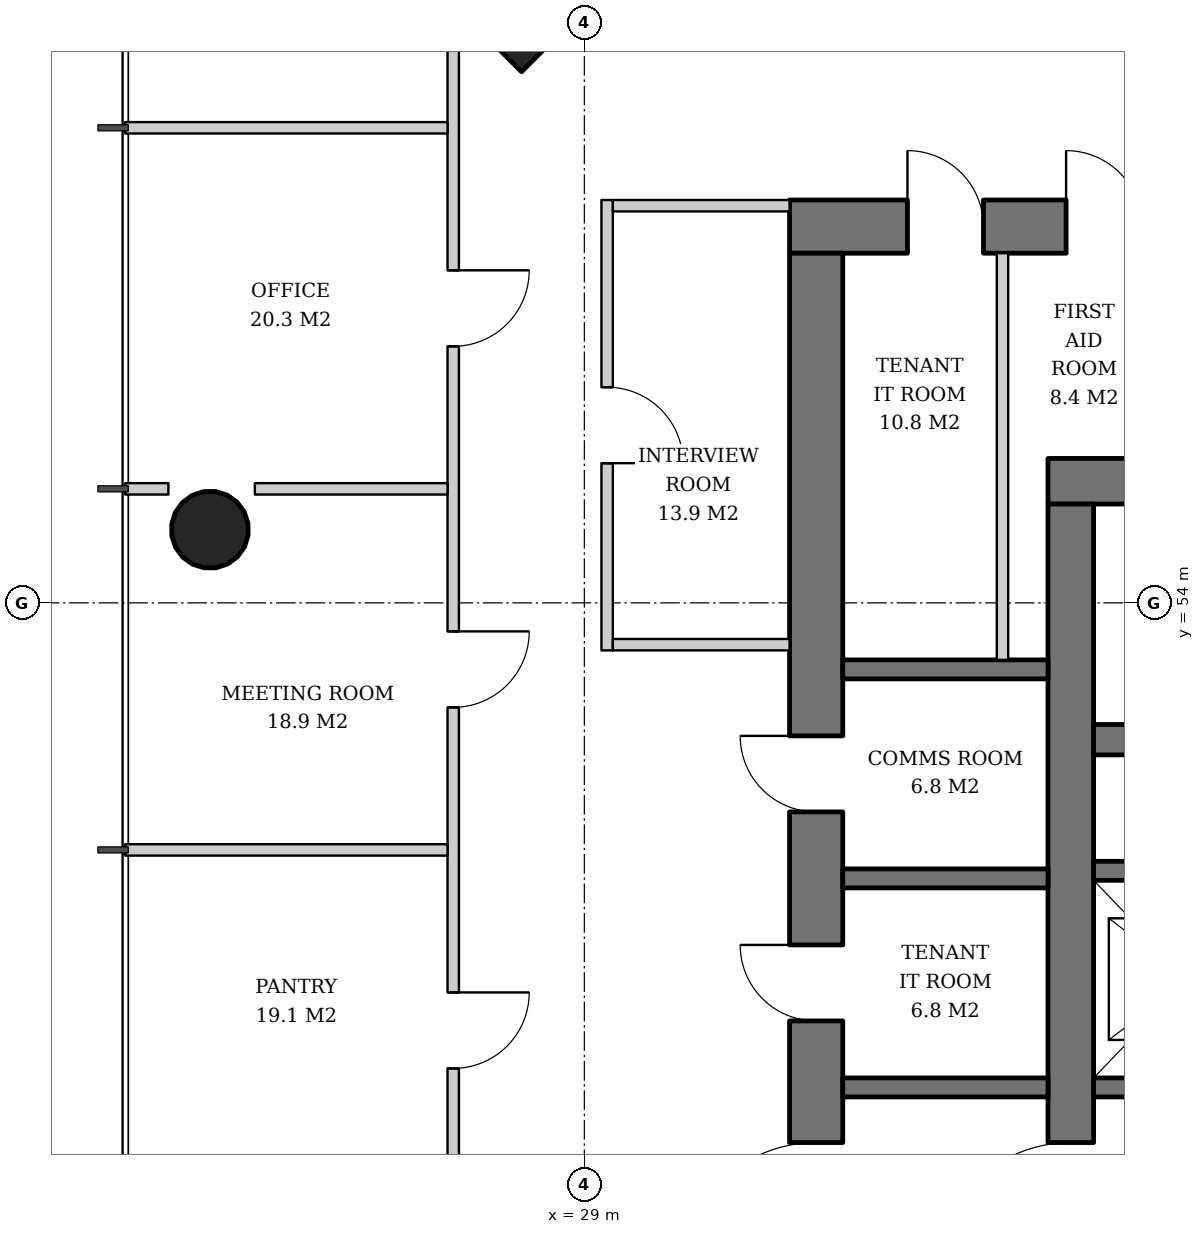
"""IFC4 building model, lengths in metres.
Left out: names, types, materials, properties, quantities, classifications, styles, units other than length and angle.
Written with IfcOpenShell. Run it as: python <this file> out.ifc"""

import sys

from ifc_helpers import new_model, si_unit, direction, frame, frame_2d, origin, origin_2d, place, context, subcontext, project, spatial, rectangle, hollow_circle, extrude, element, fill, save


model = new_model("IFC4")
c1 = context("Model", 3, precision=1e-05, world=origin(), true_north=direction((0.0, 1.0)))
c2 = subcontext(c1, "Body", "Model", "MODEL_VIEW")
j1 = project(units=[si_unit("LENGTHUNIT", "METRE"), si_unit("PLANEANGLEUNIT", "RADIAN")], contexts=[c1])
p1 = place(None, origin())
s1 = spatial("IfcSite", under=j1, at=p1, CompositionType="ELEMENT")
p2 = place(p1, origin())
s2 = spatial("IfcBuilding", under=s1, at=p2, CompositionType="ELEMENT")
p3 = place(p2, frame((0.0, 0.0, 116.0)))
s3 = spatial("IfcBuildingStorey", under=s2, at=p3, CompositionType="ELEMENT", Elevation=116.0)
p4 = place(p3, frame((28.136, 62.864, 0.0), z_axis=(0.031898107953, -0.031898107953, 0.998981992539), x_axis=(0.707106781187, 0.707106781187, 0.0)))
e1 = element("IfcColumn", 1, at=p4, inside=s3, PredefinedType="COLUMN", context=c2, shape_type="SweptSolid", body=[
    extrude(rectangle(XDim=2.6, YDim=2.6, at=origin_2d()), origin(), (0.0, 0.0, 1.0), 3.804),
])
p5 = place(p3, frame((24.036, 54.982, 0.0), z_axis=(0.031974409754, -0.015987204877, 0.999360818924), x_axis=(0.4472135955, 0.894427191, 0.0)))
e2 = element("IfcColumn", 2, at=p5, inside=s3, PredefinedType="COLUMN", context=c2, shape_type="SweptSolid", body=[
    extrude(hollow_circle(Radius=0.508, WallThickness=0.04, at=origin_2d()), origin(), (0.0, 0.0, 1.0), 3.802),
])
p6 = place(p3, frame((35.1, 55.6, 0.0), z_axis=(0.0, 0.0, 1.0), x_axis=(1.0, 0.0, 0.0)))
e3 = element("IfcWall", 3, at=p6, inside=s3, PredefinedType="SHEAR", context=c2, shape_type="SweptSolid", body=[
    extrude(rectangle(XDim=19.8, YDim=0.6, at=frame_2d((9.9, 0.0))), origin(), (0.0, 0.0, 1.0), 3.8),
])
p7 = place(p6, frame((14.54, 0.0, 0.0)))
e4 = element("IfcOpeningElement", 4, at=p7, cuts=e3, PredefinedType="OPENING", context=c2, shape_type="SweptSolid", body=[
    extrude(rectangle(XDim=1.0, YDim=2.1, at=frame_2d((0.5, 1.05))), frame((0.0, 0.31, 0.0), z_axis=(0.0, -1.0, 0.0), x_axis=(1.0, 0.0, 0.0)), (0.0, 0.0, 1.0), 0.62),
])
p8 = place(p6, frame((2.425, 0.0, 0.0)))
e5 = element("IfcOpeningElement", 5, at=p8, cuts=e3, PredefinedType="OPENING", context=c2, shape_type="SweptSolid", body=[
    extrude(rectangle(XDim=1.0, YDim=2.1, at=frame_2d((0.5, 1.05))), frame((0.0, 0.31, 0.0), z_axis=(0.0, -1.0, 0.0), x_axis=(1.0, 0.0, 0.0)), (0.0, 0.0, 1.0), 0.62),
])
p9 = place(p3, frame((35.4, 36.7, 0.0), z_axis=(0.0, 0.0, 1.0), x_axis=(0.0, 1.0, 0.0)))
e6 = element("IfcWall", 6, at=p9, inside=s3, PredefinedType="SHEAR", context=c2, shape_type="SweptSolid", body=[
    extrude(rectangle(XDim=18.6, YDim=0.6, at=frame_2d((9.3, 0.0))), origin(), (0.0, 0.0, 1.0), 3.8),
])
p10 = place(p9, frame((8.4, 0.0, 0.0)))
e7 = element("IfcOpeningElement", 7, at=p10, cuts=e6, PredefinedType="OPENING", context=c2, shape_type="SweptSolid", body=[
    extrude(rectangle(XDim=1.8, YDim=2.4, at=frame_2d((0.9, 1.2))), frame((0.0, 0.31, 0.0), z_axis=(0.0, -1.0, 0.0), x_axis=(1.0, 0.0, 0.0)), (0.0, 0.0, 1.0), 0.62),
])
p11 = place(p3, frame((31.7, 58.95, 0.0), z_axis=(0.0, 0.0, 1.0), x_axis=(1.0, 0.0, 0.0)))
e8 = element("IfcWall", 8, at=p11, inside=s3, PredefinedType="SHEAR", context=c2, shape_type="SweptSolid", body=[
    extrude(rectangle(XDim=26.6, YDim=0.7, at=frame_2d((13.3, 0.0))), origin(), (0.0, 0.0, 1.0), 3.8),
])
p12 = place(p11, frame((17.94, 0.0, 0.0)))
e9 = element("IfcOpeningElement", 9, at=p12, cuts=e8, PredefinedType="OPENING", context=c2, shape_type="SweptSolid", body=[
    extrude(rectangle(XDim=1.0, YDim=2.1, at=frame_2d((0.5, 1.05))), frame((0.0, 0.36, 0.0), z_axis=(0.0, -1.0, 0.0), x_axis=(1.0, 0.0, 0.0)), (0.0, 0.0, 1.0), 0.72),
])
p13 = place(p11, frame((5.825, 0.0, 0.0)))
e10 = element("IfcOpeningElement", 10, at=p13, cuts=e8, PredefinedType="OPENING", context=c2, shape_type="SweptSolid", body=[
    extrude(rectangle(XDim=1.0, YDim=2.1, at=frame_2d((0.5, 1.05))), frame((0.0, 0.36, 0.0), z_axis=(0.0, -1.0, 0.0), x_axis=(1.0, 0.0, 0.0)), (0.0, 0.0, 1.0), 0.72),
])
p14 = place(p11, frame((1.551, 0.0, 0.0)))
e11 = element("IfcOpeningElement", 11, at=p14, cuts=e8, PredefinedType="OPENING", context=c2, shape_type="SweptSolid", body=[
    extrude(rectangle(XDim=1.0, YDim=2.1, at=frame_2d((0.5, 1.05))), frame((0.0, 0.36, 0.0), z_axis=(0.0, -1.0, 0.0), x_axis=(1.0, 0.0, 0.0)), (0.0, 0.0, 1.0), 0.72),
])
p15 = place(p11, frame((3.638, 0.0, 0.0)))
e12 = element("IfcOpeningElement", 12, at=p15, cuts=e8, PredefinedType="OPENING", context=c2, shape_type="SweptSolid", body=[
    extrude(rectangle(XDim=1.0, YDim=2.1, at=frame_2d((0.5, 1.05))), frame((0.0, 0.36, 0.0), z_axis=(0.0, -1.0, 0.0), x_axis=(1.0, 0.0, 0.0)), (0.0, 0.0, 1.0), 0.72),
])
p16 = place(p11, frame((11.577, 0.0, 0.0)))
e13 = element("IfcOpeningElement", 13, at=p16, cuts=e8, PredefinedType="OPENING", context=c2, shape_type="SweptSolid", body=[
    extrude(rectangle(XDim=1.0, YDim=2.1, at=frame_2d((0.5, 1.05))), frame((0.0, 0.36, 0.0), z_axis=(0.0, -1.0, 0.0), x_axis=(1.0, 0.0, 0.0)), (0.0, 0.0, 1.0), 0.72),
])
p17 = place(p11, frame((20.9, 0.0, 0.0)))
e14 = element("IfcOpeningElement", 14, at=p17, cuts=e8, PredefinedType="OPENING", context=c2, shape_type="SweptSolid", body=[
    extrude(rectangle(XDim=1.0, YDim=2.1, at=frame_2d((0.5, 1.05))), frame((0.0, 0.36, 0.0), z_axis=(0.0, -1.0, 0.0), x_axis=(1.0, 0.0, 0.0)), (0.0, 0.0, 1.0), 0.72),
])
p18 = place(p11, frame((23.75, 0.0, 0.0)))
e15 = element("IfcOpeningElement", 15, at=p18, cuts=e8, PredefinedType="OPENING", context=c2, shape_type="SweptSolid", body=[
    extrude(rectangle(XDim=1.0, YDim=2.1, at=frame_2d((0.5, 1.05))), frame((0.0, 0.36, 0.0), z_axis=(0.0, -1.0, 0.0), x_axis=(1.0, 0.0, 0.0)), (0.0, 0.0, 1.0), 0.72),
])
p19 = place(p3, frame((32.05, 33.4, 0.0), z_axis=(0.0, 0.0, 1.0), x_axis=(0.0, 1.0, 0.0)))
e16 = element("IfcWall", 16, at=p19, inside=s3, PredefinedType="SHEAR", context=c2, shape_type="SweptSolid", body=[
    extrude(rectangle(XDim=25.2, YDim=0.7, at=frame_2d((12.6, 0.0))), origin(), (0.0, 0.0, 1.0), 3.8),
])
p20 = place(p19, frame((11.7, 0.0, 0.0)))
e17 = element("IfcOpeningElement", 17, at=p20, cuts=e16, PredefinedType="OPENING", context=c2, shape_type="SweptSolid", body=[
    extrude(rectangle(XDim=1.8, YDim=2.4, at=frame_2d((0.9, 1.2))), frame((0.0, 0.36, 0.0), z_axis=(0.0, -1.0, 0.0), x_axis=(1.0, 0.0, 0.0)), (0.0, 0.0, 1.0), 0.72),
])
p21 = place(p19, frame((3.6, 0.0, 0.0)))
e18 = element("IfcOpeningElement", 18, at=p21, cuts=e16, PredefinedType="OPENING", context=c2, shape_type="SweptSolid", body=[
    extrude(rectangle(XDim=1.0, YDim=2.1, at=frame_2d((0.5, 1.05))), frame((0.0, 0.36, 0.0), z_axis=(0.0, -1.0, 0.0), x_axis=(1.0, 0.0, 0.0)), (0.0, 0.0, 1.0), 0.72),
])
p22 = place(p19, frame((6.35, 0.0, 0.0)))
e19 = element("IfcOpeningElement", 19, at=p22, cuts=e16, PredefinedType="OPENING", context=c2, shape_type="SweptSolid", body=[
    extrude(rectangle(XDim=1.0, YDim=2.1, at=frame_2d((0.5, 1.05))), frame((0.0, 0.36, 0.0), z_axis=(0.0, -1.0, 0.0), x_axis=(1.0, 0.0, 0.0)), (0.0, 0.0, 1.0), 0.72),
])
p23 = place(p19, frame((9.1, 0.0, 0.0)))
e20 = element("IfcOpeningElement", 20, at=p23, cuts=e16, PredefinedType="OPENING", context=c2, shape_type="SweptSolid", body=[
    extrude(rectangle(XDim=1.0, YDim=2.1, at=frame_2d((0.5, 1.05))), frame((0.0, 0.36, 0.0), z_axis=(0.0, -1.0, 0.0), x_axis=(1.0, 0.0, 0.0)), (0.0, 0.0, 1.0), 0.72),
])
p24 = place(p19, frame((15.1, 0.0, 0.0)))
e21 = element("IfcOpeningElement", 21, at=p24, cuts=e16, PredefinedType="OPENING", context=c2, shape_type="SweptSolid", body=[
    extrude(rectangle(XDim=1.0, YDim=2.1, at=frame_2d((0.5, 1.05))), frame((0.0, 0.36, 0.0), z_axis=(0.0, -1.0, 0.0), x_axis=(1.0, 0.0, 0.0)), (0.0, 0.0, 1.0), 0.72),
])
p25 = place(p19, frame((17.85, 0.0, 0.0)))
e22 = element("IfcOpeningElement", 22, at=p25, cuts=e16, PredefinedType="OPENING", context=c2, shape_type="SweptSolid", body=[
    extrude(rectangle(XDim=1.0, YDim=2.1, at=frame_2d((0.5, 1.05))), frame((0.0, 0.36, 0.0), z_axis=(0.0, -1.0, 0.0), x_axis=(1.0, 0.0, 0.0)), (0.0, 0.0, 1.0), 0.72),
])
p26 = place(p3, frame((35.7, 52.2, 0.0), z_axis=(0.0, 0.0, 1.0), x_axis=(1.0, 0.0, 0.0)))
e23 = element("IfcWall", 23, at=p26, inside=s3, PredefinedType="SHEAR", context=c2, shape_type="SweptSolid", body=[
    extrude(rectangle(XDim=18.6, YDim=0.4, at=frame_2d((9.3, 0.0))), origin(), (0.0, 0.0, 1.0), 3.8),
])
p27 = place(p3, frame((35.7, 50.475, 0.0), z_axis=(0.0, 0.0, 1.0), x_axis=(1.0, 0.0, 0.0)))
e24 = element("IfcWall", 24, at=p27, inside=s3, PredefinedType="SHEAR", context=c2, shape_type="SweptSolid", body=[
    extrude(rectangle(XDim=11.0, YDim=0.25, at=frame_2d((5.5, 0.0))), origin(), (0.0, 0.0, 1.0), 3.8),
])
p28 = place(p3, frame((35.7, 47.625, 0.0), z_axis=(0.0, 0.0, 1.0), x_axis=(1.0, 0.0, 0.0)))
e25 = element("IfcWall", 25, at=p28, inside=s3, PredefinedType="SHEAR", context=c2, shape_type="SweptSolid", body=[
    extrude(rectangle(XDim=12.83, YDim=0.25, at=frame_2d((6.415, 0.0))), origin(), (0.0, 0.0, 1.0), 3.8),
])
p29 = place(p28, frame((0.7, 0.0, 0.0)))
e26 = element("IfcOpeningElement", 26, at=p29, cuts=e25, PredefinedType="OPENING", context=c2, shape_type="SweptSolid", body=[
    extrude(rectangle(XDim=1.1, YDim=2.2, at=frame_2d((0.55, 1.1))), frame((0.0, 0.135, 0.0), z_axis=(0.0, -1.0, 0.0), x_axis=(1.0, 0.0, 0.0)), (0.0, 0.0, 1.0), 0.27),
])
p30 = place(p28, frame((3.45, 0.0, 0.0)))
e27 = element("IfcOpeningElement", 27, at=p30, cuts=e25, PredefinedType="OPENING", context=c2, shape_type="SweptSolid", body=[
    extrude(rectangle(XDim=1.1, YDim=2.2, at=frame_2d((0.55, 1.1))), frame((0.0, 0.135, 0.0), z_axis=(0.0, -1.0, 0.0), x_axis=(1.0, 0.0, 0.0)), (0.0, 0.0, 1.0), 0.27),
])
p31 = place(p28, frame((6.2, 0.0, 0.0)))
e28 = element("IfcOpeningElement", 28, at=p31, cuts=e25, PredefinedType="OPENING", context=c2, shape_type="SweptSolid", body=[
    extrude(rectangle(XDim=1.1, YDim=2.2, at=frame_2d((0.55, 1.1))), frame((0.0, 0.135, 0.0), z_axis=(0.0, -1.0, 0.0), x_axis=(1.0, 0.0, 0.0)), (0.0, 0.0, 1.0), 0.27),
])
p32 = place(p28, frame((8.95, 0.0, 0.0)))
e29 = element("IfcOpeningElement", 29, at=p32, cuts=e25, PredefinedType="OPENING", context=c2, shape_type="SweptSolid", body=[
    extrude(rectangle(XDim=1.1, YDim=2.2, at=frame_2d((0.55, 1.1))), frame((0.0, 0.135, 0.0), z_axis=(0.0, -1.0, 0.0), x_axis=(1.0, 0.0, 0.0)), (0.0, 0.0, 1.0), 0.27),
])
p33 = place(p28, frame((11.515, 0.0, 0.0)))
e30 = element("IfcOpeningElement", 30, at=p33, cuts=e25, PredefinedType="OPENING", context=c2, shape_type="SweptSolid", body=[
    extrude(rectangle(XDim=0.8, YDim=2.0, at=frame_2d((0.4, 1.0))), frame((0.0, 0.135, 0.0), z_axis=(0.0, -1.0, 0.0), x_axis=(1.0, 0.0, 0.0)), (0.0, 0.0, 1.0), 0.27),
])
for number, where, z_axis, x_axis in (
    (31, (32.4, 47.625, 0.0), (0.0, 0.0, 1.0), (1.0, 0.0, 0.0)),
    (32, (32.4, 50.375, 0.0), (0.0, 0.0, 1.0), (1.0, 0.0, 0.0)),
    (33, (32.4, 53.125, 0.0), (0.0, 0.0, 1.0), (1.0, 0.0, 0.0)),
):
    element("IfcWall", number, at=place(p3, frame(where, z_axis=z_axis, x_axis=x_axis)), inside=s3, PredefinedType="SHEAR", context=c2, shape_type="SweptSolid", body=[
        extrude(rectangle(XDim=2.7, YDim=0.25, at=frame_2d((1.35, 0.0))), origin(), (0.0, 0.0, 1.0), 3.8),
    ])
p34 = place(p3, frame((34.501, 53.25, 0.0), z_axis=(0.0, 0.0, 1.0), x_axis=(0.0, 1.0, 0.0)))
e34 = element("IfcWall", 34, at=p34, inside=s3, PredefinedType="SOLIDWALL", context=c2, shape_type="SweptSolid", body=[
    extrude(rectangle(XDim=5.35, YDim=0.15, at=frame_2d((2.675, 0.0))), origin(), (0.0, 0.0, 1.0), 3.62),
])
p35 = place(p3, frame((29.3, 59.3, 0.0), z_axis=(0.0, 0.0, 1.0), x_axis=(0.0, -1.0, 0.0)))
e35 = element("IfcWall", 35, at=p35, inside=s3, PredefinedType="PARTITIONING", context=c2, shape_type="SweptSolid", body=[
    extrude(rectangle(XDim=5.925, YDim=0.15, at=frame_2d((2.962, 0.0))), origin(), (0.0, 0.0, 1.0), 2.72),
])
p36 = place(p35, frame((2.462, 0.0, 0.0)))
e36 = element("IfcOpeningElement", 36, at=p36, cuts=e35, PredefinedType="OPENING", context=c2, shape_type="SweptSolid", body=[
    extrude(rectangle(XDim=1.0, YDim=2.1, at=frame_2d((0.5, 1.05))), frame((0.0, 0.085, 0.0), z_axis=(0.0, -1.0, 0.0), x_axis=(1.0, 0.0, 0.0)), (0.0, 0.0, 1.0), 0.17),
])
for number, where, z_axis, x_axis in (
    (37, (31.7, 59.225, 0.0), (0.0, 0.0, 1.0), (-1.0, 0.0, 0.0)),
    (38, (31.7, 53.45, 0.0), (0.0, 0.0, 1.0), (-1.0, 0.0, 0.0)),
):
    element("IfcWall", number, at=place(p3, frame(where, z_axis=z_axis, x_axis=x_axis)), inside=s3, PredefinedType="PARTITIONING", context=c2, shape_type="SweptSolid", body=[
        extrude(rectangle(XDim=2.325, YDim=0.15, at=frame_2d((1.163, 0.0))), origin(), (0.0, 0.0, 1.0), 3.62),
    ])
p37 = place(p3, frame((27.275, 61.812, 0.0), z_axis=(0.0, 0.0, 1.0), x_axis=(0.0, -1.0, 0.0)))
e39 = element("IfcWall", 39, at=p37, inside=s3, PredefinedType="PARTITIONING", context=c2, shape_type="SweptSolid", body=[
    extrude(rectangle(XDim=31.623, YDim=0.15, at=frame_2d((15.812, 0.0))), origin(), (0.0, 0.0, 1.0), 2.72),
])
p38 = place(p37, frame((3.437, 0.0, 0.0)))
e40 = element("IfcOpeningElement", 40, at=p38, cuts=e39, PredefinedType="OPENING", context=c2, shape_type="SweptSolid", body=[
    extrude(rectangle(XDim=1.0, YDim=2.1, at=frame_2d((0.5, 1.05))), frame((0.0, 0.085, 0.0), z_axis=(0.0, -1.0, 0.0), x_axis=(1.0, 0.0, 0.0)), (0.0, 0.0, 1.0), 0.17),
])
p39 = place(p37, frame((8.187, 0.0, 0.0)))
e41 = element("IfcOpeningElement", 41, at=p39, cuts=e39, PredefinedType="OPENING", context=c2, shape_type="SweptSolid", body=[
    extrude(rectangle(XDim=1.0, YDim=2.1, at=frame_2d((0.5, 1.05))), frame((0.0, 0.085, 0.0), z_axis=(0.0, -1.0, 0.0), x_axis=(1.0, 0.0, 0.0)), (0.0, 0.0, 1.0), 0.17),
])
p40 = place(p37, frame((12.937, 0.0, 0.0)))
e42 = element("IfcOpeningElement", 42, at=p40, cuts=e39, PredefinedType="OPENING", context=c2, shape_type="SweptSolid", body=[
    extrude(rectangle(XDim=1.0, YDim=2.1, at=frame_2d((0.5, 1.05))), frame((0.0, 0.085, 0.0), z_axis=(0.0, -1.0, 0.0), x_axis=(1.0, 0.0, 0.0)), (0.0, 0.0, 1.0), 0.17),
])
p41 = place(p37, frame((17.787, 0.0, 0.0)))
e43 = element("IfcOpeningElement", 43, at=p41, cuts=e39, PredefinedType="OPENING", context=c2, shape_type="SweptSolid", body=[
    extrude(rectangle(XDim=0.8, YDim=2.1, at=frame_2d((0.4, 1.05))), frame((0.0, 0.085, 0.0), z_axis=(0.0, -1.0, 0.0), x_axis=(1.0, 0.0, 0.0)), (0.0, 0.0, 1.0), 0.17),
])
p42 = place(p37, frame((22.437, 0.0, 0.0)))
e44 = element("IfcOpeningElement", 44, at=p42, cuts=e39, PredefinedType="OPENING", context=c2, shape_type="SweptSolid", body=[
    extrude(rectangle(XDim=1.0, YDim=2.1, at=frame_2d((0.5, 1.05))), frame((0.0, 0.085, 0.0), z_axis=(0.0, -1.0, 0.0), x_axis=(1.0, 0.0, 0.0)), (0.0, 0.0, 1.0), 0.17),
])
p43 = place(p37, frame((27.287, 0.0, 0.0)))
e45 = element("IfcOpeningElement", 45, at=p43, cuts=e39, PredefinedType="OPENING", context=c2, shape_type="SweptSolid", body=[
    extrude(rectangle(XDim=0.8, YDim=2.1, at=frame_2d((0.4, 1.05))), frame((0.0, 0.085, 0.0), z_axis=(0.0, -1.0, 0.0), x_axis=(1.0, 0.0, 0.0)), (0.0, 0.0, 1.0), 0.17),
])
p44 = place(p3, frame((27.2, 60.25, 0.0), z_axis=(0.0, 0.0, 1.0), x_axis=(-1.0, 0.0, 0.0)))
e46 = element("IfcWall", 46, at=p44, inside=s3, PredefinedType="PARTITIONING", context=c2, shape_type="SweptSolid", body=[
    extrude(rectangle(XDim=4.24, YDim=0.15, at=frame_2d((2.12, 0.0))), origin(), (0.0, 0.0, 1.0), 2.82),
])
p45 = place(p3, frame((27.2, 55.5, 0.0), z_axis=(0.0, 0.0, 1.0), x_axis=(-1.0, 0.0, 0.0)))
e47 = element("IfcWall", 47, at=p45, inside=s3, PredefinedType="PARTITIONING", context=c2, shape_type="SweptSolid", body=[
    extrude(rectangle(XDim=2.535, YDim=0.15, at=frame_2d((1.268, 0.0))), origin(), (0.0, 0.0, 1.0), 3.62),
])
p46 = place(p3, frame((23.528, 55.5, 0.0), z_axis=(0.0, 0.0, 1.0), x_axis=(-1.0, 0.0, 0.0)))
e48 = element("IfcWall", 48, at=p46, inside=s3, PredefinedType="PARTITIONING", context=c2, shape_type="SweptSolid", body=[
    extrude(rectangle(XDim=0.568, YDim=0.15, at=frame_2d((0.284, 0.0))), origin(), (0.0, 0.0, 1.0), 3.62),
])
p47 = place(p3, frame((27.2, 50.75, 0.0), z_axis=(0.0, 0.0, 1.0), x_axis=(-1.0, 0.0, 0.0)))
e49 = element("IfcWall", 49, at=p47, inside=s3, PredefinedType="PARTITIONING", context=c2, shape_type="SweptSolid", body=[
    extrude(rectangle(XDim=4.24, YDim=0.15, at=frame_2d((2.12, 0.0))), origin(), (0.0, 0.0, 1.0), 2.82),
])
p48 = place(p10, origin())
e50 = element("IfcDoor", 50, at=p48, inside=s3, OperationType="DOUBLE_DOOR_SINGLE_SWING", PredefinedType="DOOR", context=c2, shape_type="SweptSolid", body=[
    extrude(rectangle(XDim=1.8, YDim=2.4, at=frame_2d((0.9, 1.2))), frame((0.0, 0.025, 0.0), z_axis=(0.0, -1.0, 0.0), x_axis=(1.0, 0.0, 0.0)), (0.0, 0.0, 1.0), 0.05),
])
fill(e7, e50)
p49 = place(p20, origin())
e51 = element("IfcDoor", 51, at=p49, inside=s3, OperationType="DOUBLE_DOOR_SINGLE_SWING", PredefinedType="DOOR", context=c2, shape_type="SweptSolid", body=[
    extrude(rectangle(XDim=1.8, YDim=2.4, at=frame_2d((0.9, 1.2))), frame((0.0, 0.025, 0.0), z_axis=(0.0, -1.0, 0.0), x_axis=(1.0, 0.0, 0.0)), (0.0, 0.0, 1.0), 0.05),
])
fill(e17, e51)
p50 = place(p24, origin())
e52 = element("IfcDoor", 52, at=p50, inside=s3, OperationType="SINGLE_SWING_RIGHT", PredefinedType="DOOR", context=c2, shape_type="SweptSolid", body=[
    extrude(rectangle(XDim=1.0, YDim=2.1, at=frame_2d((0.5, 1.05))), frame((0.0, -0.29, 0.0), z_axis=(0.0, -1.0, 0.0), x_axis=(1.0, 0.0, 0.0)), (0.0, 0.0, 1.0), 0.05),
])
fill(e21, e52)
p51 = place(p25, origin())
e53 = element("IfcDoor", 53, at=p51, inside=s3, OperationType="SINGLE_SWING_RIGHT", PredefinedType="DOOR", context=c2, shape_type="SweptSolid", body=[
    extrude(rectangle(XDim=1.0, YDim=2.1, at=frame_2d((0.5, 1.05))), frame((0.0, -0.29, 0.0), z_axis=(0.0, -1.0, 0.0), x_axis=(1.0, 0.0, 0.0)), (0.0, 0.0, 1.0), 0.05),
])
fill(e22, e53)
p52 = place(p14, origin())
e54 = element("IfcDoor", 54, at=p52, inside=s3, OperationType="SINGLE_SWING_LEFT", PredefinedType="DOOR", context=c2, shape_type="SweptSolid", body=[
    extrude(rectangle(XDim=1.0, YDim=2.1, at=frame_2d((0.5, 1.05))), frame((0.0, -0.29, 0.0), z_axis=(0.0, -1.0, 0.0), x_axis=(1.0, 0.0, 0.0)), (0.0, 0.0, 1.0), 0.05),
])
fill(e11, e54)
p53 = place(p15, origin())
e55 = element("IfcDoor", 55, at=p53, inside=s3, OperationType="SINGLE_SWING_LEFT", PredefinedType="DOOR", context=c2, shape_type="SweptSolid", body=[
    extrude(rectangle(XDim=1.0, YDim=2.1, at=frame_2d((0.5, 1.05))), frame((0.0, -0.29, 0.0), z_axis=(0.0, -1.0, 0.0), x_axis=(1.0, 0.0, 0.0)), (0.0, 0.0, 1.0), 0.05),
])
fill(e12, e55)
p54 = place(p36, origin())
e56 = element("IfcDoor", 56, at=p54, inside=s3, OperationType="SINGLE_SWING_RIGHT", PredefinedType="DOOR", context=c2, shape_type="SweptSolid", body=[
    extrude(rectangle(XDim=1.0, YDim=2.1, at=frame_2d((0.5, 1.05))), frame((0.0, 0.025, 0.0), z_axis=(0.0, -1.0, 0.0), x_axis=(1.0, 0.0, 0.0)), (0.0, 0.0, 1.0), 0.05),
])
fill(e36, e56)
p55 = place(p38, origin())
e57 = element("IfcDoor", 57, at=p55, inside=s3, OperationType="SINGLE_SWING_LEFT", PredefinedType="DOOR", context=c2, shape_type="SweptSolid", body=[
    extrude(rectangle(XDim=1.0, YDim=2.1, at=frame_2d((0.5, 1.05))), frame((0.0, 0.025, 0.0), z_axis=(0.0, -1.0, 0.0), x_axis=(1.0, 0.0, 0.0)), (0.0, 0.0, 1.0), 0.05),
])
fill(e40, e57)
p56 = place(p39, origin())
e58 = element("IfcDoor", 58, at=p56, inside=s3, OperationType="SINGLE_SWING_LEFT", PredefinedType="DOOR", context=c2, shape_type="SweptSolid", body=[
    extrude(rectangle(XDim=1.0, YDim=2.1, at=frame_2d((0.5, 1.05))), frame((0.0, 0.025, 0.0), z_axis=(0.0, -1.0, 0.0), x_axis=(1.0, 0.0, 0.0)), (0.0, 0.0, 1.0), 0.05),
])
fill(e41, e58)
p57 = place(p40, origin())
e59 = element("IfcDoor", 59, at=p57, inside=s3, OperationType="SINGLE_SWING_LEFT", PredefinedType="DOOR", context=c2, shape_type="SweptSolid", body=[
    extrude(rectangle(XDim=1.0, YDim=2.1, at=frame_2d((0.5, 1.05))), frame((0.0, 0.025, 0.0), z_axis=(0.0, -1.0, 0.0), x_axis=(1.0, 0.0, 0.0)), (0.0, 0.0, 1.0), 0.05),
])
fill(e42, e59)
save(model, sys.argv[1])
